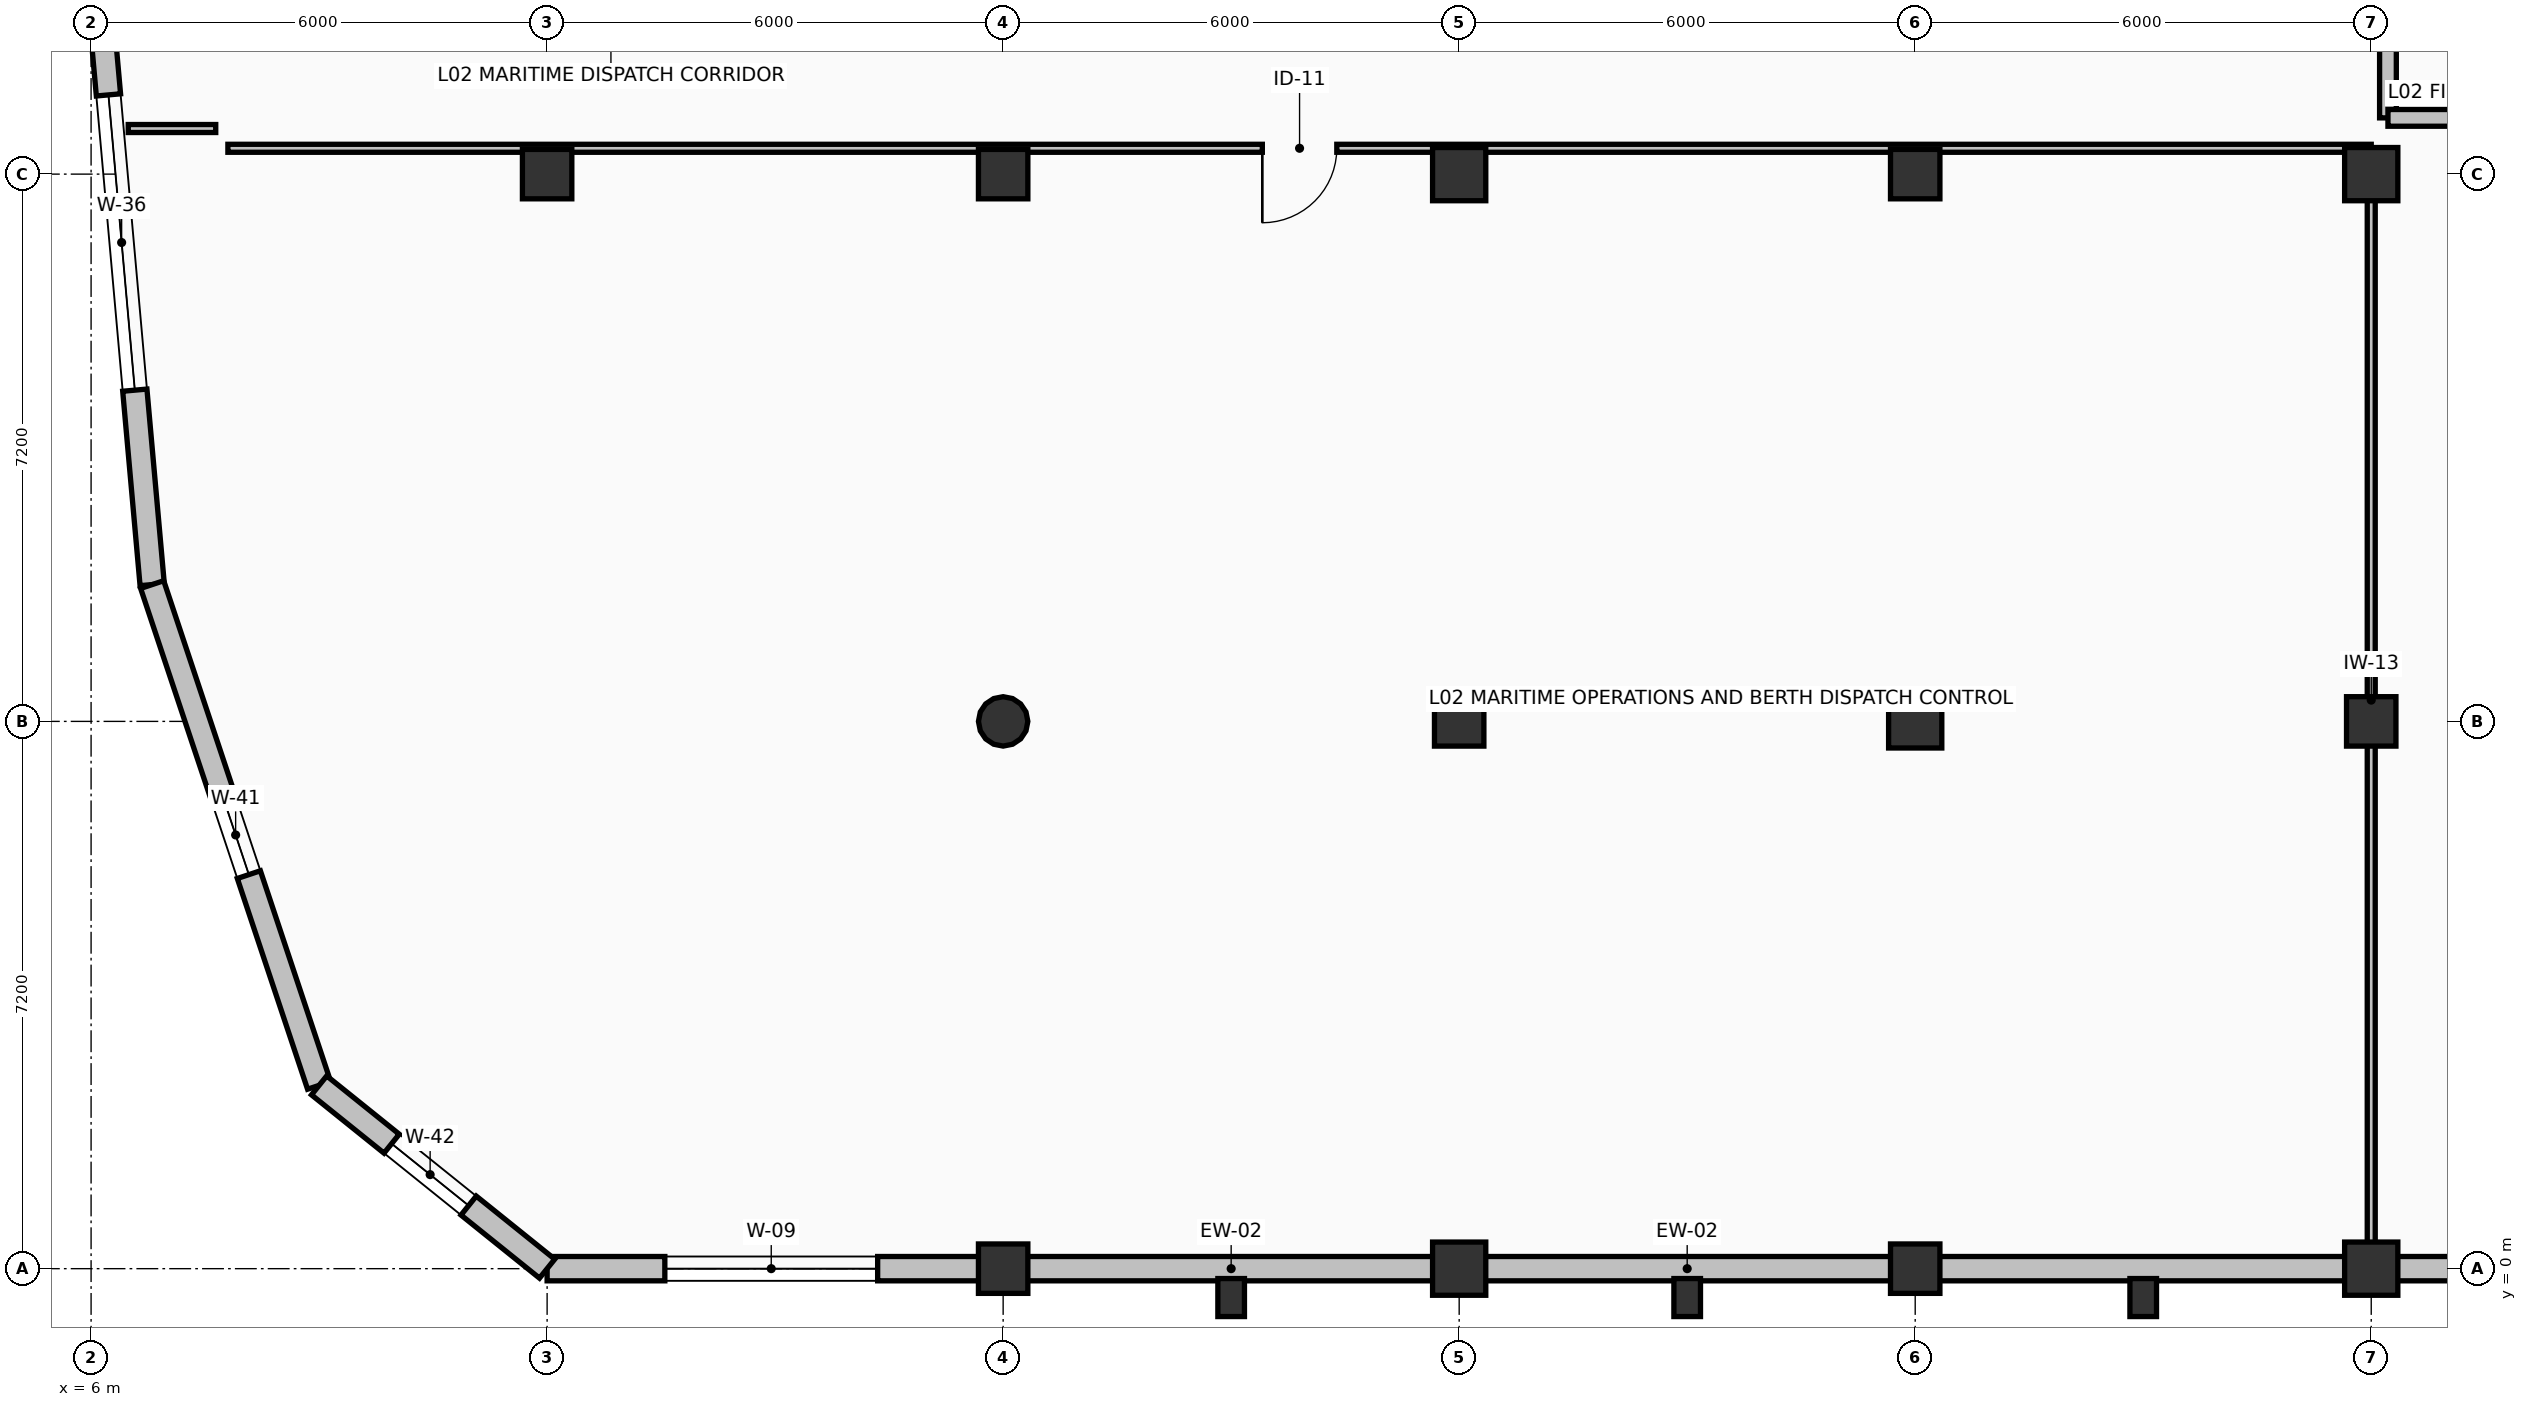
"""IFC4 building model, lengths in metres.
Left out: names, types, materials, properties, quantities, classifications, styles, units other than length and angle.
Written with IfcOpenShell. Run it as: python <this file> out.ifc"""

import sys

from ifc_helpers import new_model, si_unit, direction, frame, frame_2d, origin, origin_2d, place, context, subcontext, project, spatial, rectangle, circle, extrude, element, fill, save


model = new_model("IFC4")
c1 = context("Model", 3, precision=1e-05, world=origin(), true_north=direction((0.0, 1.0)))
c2 = subcontext(c1, "Body", "Model", "MODEL_VIEW")
j1 = project(units=[si_unit("LENGTHUNIT", "METRE"), si_unit("PLANEANGLEUNIT", "RADIAN")], contexts=[c1])
p1 = place(None, origin())
s1 = spatial("IfcSite", under=j1, at=p1, CompositionType="ELEMENT")
p2 = place(p1, origin())
s2 = spatial("IfcBuilding", under=s1, at=p2, CompositionType="ELEMENT")
p3 = place(p2, frame((0.0, 0.0, 9.84)))
s3 = spatial("IfcBuildingStorey", under=s2, at=p3, CompositionType="ELEMENT", Elevation=9.84)
for number, where, z_axis, x_axis in (
    (1, (12.0, 14.4, 0.0), (0.0, 0.0, 1.0), (1.0, 0.0, 0.0)),
    (2, (18.0, 0.0, 0.0), (0.0, 0.0, 1.0), (1.0, 0.0, 0.0)),
):
    element("IfcColumn", number, at=place(p3, frame(where, z_axis=z_axis, x_axis=x_axis)), inside=s3, PredefinedType="COLUMN", context=c2, shape_type="SweptSolid", body=[
        extrude(rectangle(XDim=0.65, YDim=0.65, at=origin_2d()), origin(), (0.0, 0.0, 1.0), 3.74),
    ])
p4 = place(p3, frame((18.0, 7.2, 0.0), z_axis=(0.0, 0.0, 1.0), x_axis=(1.0, 0.0, 0.0)))
e3 = element("IfcColumn", 3, at=p4, inside=s3, PredefinedType="COLUMN", context=c2, shape_type="SweptSolid", body=[
    extrude(circle(Radius=0.325, at=origin_2d()), origin(), (0.0, 0.0, 1.0), 3.74),
])
p5 = place(p3, frame((18.0, 14.4, 0.0), z_axis=(0.0, 0.0, 1.0), x_axis=(1.0, 0.0, 0.0)))
e4 = element("IfcColumn", 4, at=p5, inside=s3, PredefinedType="COLUMN", context=c2, shape_type="SweptSolid", body=[
    extrude(rectangle(XDim=0.65, YDim=0.65, at=origin_2d()), origin(), (0.0, 0.0, 1.0), 3.74),
])
p6 = place(p3, frame((24.0, 0.0, 0.0), z_axis=(0.0, 0.0, 1.0), x_axis=(1.0, 0.0, 0.0)))
e5 = element("IfcColumn", 5, at=p6, inside=s3, PredefinedType="COLUMN", context=c2, shape_type="SweptSolid", body=[
    extrude(rectangle(XDim=0.7, YDim=0.7, at=origin_2d()), origin(), (0.0, 0.0, 1.0), 3.74),
])
p7 = place(p3, frame((24.0, 7.2, 0.0), z_axis=(0.0, 0.0, 1.0), x_axis=(1.0, 0.0, 0.0)))
e6 = element("IfcColumn", 6, at=p7, inside=s3, PredefinedType="COLUMN", context=c2, shape_type="SweptSolid", body=[
    extrude(rectangle(XDim=0.65, YDim=0.65, at=origin_2d()), origin(), (0.0, 0.0, 1.0), 3.74),
])
p8 = place(p3, frame((24.0, 14.4, 0.0), z_axis=(0.0, 0.0, 1.0), x_axis=(1.0, 0.0, 0.0)))
e7 = element("IfcColumn", 7, at=p8, inside=s3, PredefinedType="COLUMN", context=c2, shape_type="SweptSolid", body=[
    extrude(rectangle(XDim=0.7, YDim=0.7, at=origin_2d()), origin(), (0.0, 0.0, 1.0), 3.74),
])
p9 = place(p3, frame((30.0, 0.0, 0.0), z_axis=(0.0, 0.0, 1.0), x_axis=(1.0, 0.0, 0.0)))
e8 = element("IfcColumn", 8, at=p9, inside=s3, PredefinedType="COLUMN", context=c2, shape_type="SweptSolid", body=[
    extrude(rectangle(XDim=0.65, YDim=0.65, at=origin_2d()), origin(), (0.0, 0.0, 1.0), 3.74),
])
p10 = place(p3, frame((30.0, 7.2, 0.0), z_axis=(0.0, 0.0, 1.0), x_axis=(1.0, 0.0, 0.0)))
e9 = element("IfcColumn", 9, at=p10, inside=s3, PredefinedType="COLUMN", context=c2, shape_type="SweptSolid", body=[
    extrude(rectangle(XDim=0.7, YDim=0.7, at=origin_2d()), origin(), (0.0, 0.0, 1.0), 3.74),
])
p11 = place(p3, frame((30.0, 14.4, 0.0), z_axis=(0.0, 0.0, 1.0), x_axis=(1.0, 0.0, 0.0)))
e10 = element("IfcColumn", 10, at=p11, inside=s3, PredefinedType="COLUMN", context=c2, shape_type="SweptSolid", body=[
    extrude(rectangle(XDim=0.65, YDim=0.65, at=origin_2d()), origin(), (0.0, 0.0, 1.0), 3.74),
])
p12 = place(p3, frame((36.0, 0.0, 0.0), z_axis=(0.0, 0.0, 1.0), x_axis=(1.0, 0.0, 0.0)))
e11 = element("IfcColumn", 11, at=p12, inside=s3, PredefinedType="COLUMN", context=c2, shape_type="SweptSolid", body=[
    extrude(rectangle(XDim=0.7, YDim=0.7, at=origin_2d()), origin(), (0.0, 0.0, 1.0), 3.74),
])
p13 = place(p3, frame((36.0, 7.2, 0.0), z_axis=(0.0, 0.0, 1.0), x_axis=(1.0, 0.0, 0.0)))
e12 = element("IfcColumn", 12, at=p13, inside=s3, PredefinedType="COLUMN", context=c2, shape_type="SweptSolid", body=[
    extrude(rectangle(XDim=0.65, YDim=0.65, at=origin_2d()), origin(), (0.0, 0.0, 1.0), 3.74),
])
p14 = place(p3, frame((36.0, 14.4, 0.0), z_axis=(0.0, 0.0, 1.0), x_axis=(1.0, 0.0, 0.0)))
e13 = element("IfcColumn", 13, at=p14, inside=s3, PredefinedType="COLUMN", context=c2, shape_type="SweptSolid", body=[
    extrude(rectangle(XDim=0.7, YDim=0.7, at=origin_2d()), origin(), (0.0, 0.0, 1.0), 3.74),
])
for number, where, z_axis, x_axis in (
    (14, (21.0, -0.38, 0.0), (0.0, 0.0, 1.0), (1.0, 0.0, 0.0)),
    (15, (27.0, -0.38, 0.0), (0.0, 0.0, 1.0), (1.0, 0.0, 0.0)),
    (16, (33.0, -0.38, 0.0), (0.0, 0.0, 1.0), (1.0, 0.0, 0.0)),
):
    element("IfcColumn", number, at=place(p3, frame(where, z_axis=z_axis, x_axis=x_axis)), inside=s3, PredefinedType="PILASTER", context=c2, shape_type="SweptSolid", body=[
        extrude(rectangle(XDim=0.35, YDim=0.5, at=origin_2d()), origin(), (0.0, 0.0, 1.0), 3.74),
    ])
p15 = place(p3, frame((12.0, 0.0, 0.0), z_axis=(0.0, 0.0, 1.0), x_axis=(1.0, 0.0, 0.0)))
e17 = element("IfcWall", 17, at=p15, inside=s3, PredefinedType="SOLIDWALL", context=c2, shape_type="SweptSolid", body=[
    extrude(rectangle(XDim=6.0, YDim=0.32, at=frame_2d((3.0, 0.0))), origin(), (0.0, 0.0, 1.0), 3.44),
])
p16 = place(p15, frame((1.549, 0.0, 0.95)))
e18 = element("IfcOpeningElement", 18, at=p16, cuts=e17, PredefinedType="OPENING", context=c2, shape_type="SweptSolid", body=[
    extrude(rectangle(XDim=2.8, YDim=1.35, at=frame_2d((1.4, 0.675))), frame((0.0, 0.17, 0.0), z_axis=(0.0, -1.0, 0.0), x_axis=(1.0, 0.0, 0.0)), (0.0, 0.0, 1.0), 0.34),
])
for number, where, z_axis, x_axis in (
    (19, (18.0, 0.0, 0.0), (0.0, 0.0, 1.0), (1.0, 0.0, 0.0)),
    (20, (24.0, 0.0, 0.0), (0.0, 0.0, 1.0), (1.0, 0.0, 0.0)),
    (21, (30.0, 0.0, 0.0), (0.0, 0.0, 1.0), (1.0, 0.0, 0.0)),
    (22, (36.0, 0.0, 0.0), (0.0, 0.0, 1.0), (1.0, 0.0, 0.0)),
):
    element("IfcWall", number, at=place(p3, frame(where, z_axis=z_axis, x_axis=x_axis)), inside=s3, PredefinedType="SOLIDWALL", context=c2, shape_type="SweptSolid", body=[
        extrude(rectangle(XDim=6.0, YDim=0.32, at=frame_2d((3.0, 0.0))), origin(), (0.0, 0.0, 1.0), 2.77),
    ])
p17 = place(p3, frame((6.0, 18.0, 0.0), z_axis=(0.0, 0.0, 1.0), x_axis=(0.088947255406, -0.996036337568, 0.0)))
e23 = element("IfcWall", 23, at=p17, inside=s3, PredefinedType="SOLIDWALL", context=c2, shape_type="SweptSolid", body=[
    extrude(rectangle(XDim=9.036, YDim=0.32, at=frame_2d((4.518, 0.0))), origin(), (0.0, 0.0, 1.0), 3.44),
])
p18 = place(p17, frame((2.568, 0.0, 0.95)))
e24 = element("IfcOpeningElement", 24, at=p18, cuts=e23, PredefinedType="OPENING", context=c2, shape_type="SweptSolid", body=[
    extrude(rectangle(XDim=3.9, YDim=1.55, at=frame_2d((1.95, 0.775))), frame((0.0, 0.17, 0.0), z_axis=(0.0, -1.0, 0.0), x_axis=(1.0, 0.0, 0.0)), (0.0, 0.0, 1.0), 0.34),
])
p19 = place(p3, frame((6.804, 9.0, 0.0), z_axis=(0.0, 0.0, 1.0), x_axis=(0.31624885857, -0.948676266939, 0.0)))
e25 = element("IfcWall", 25, at=p19, inside=s3, PredefinedType="SOLIDWALL", context=c2, shape_type="SweptSolid", body=[
    extrude(rectangle(XDim=6.945, YDim=0.32, at=frame_2d((3.472, 0.0))), origin(), (0.0, 0.0, 1.0), 3.44),
])
p20 = place(p19, frame((2.922, 0.0, 1.15)))
e26 = element("IfcOpeningElement", 26, at=p20, cuts=e25, PredefinedType="OPENING", context=c2, shape_type="SweptSolid", body=[
    extrude(rectangle(XDim=1.1, YDim=1.1, at=frame_2d((0.55, 0.55))), frame((0.0, 0.17, 0.0), z_axis=(0.0, -1.0, 0.0), x_axis=(1.0, 0.0, 0.0)), (0.0, 0.0, 1.0), 0.34),
])
p21 = place(p3, frame((9.0, 2.412, 0.0), z_axis=(0.0, 0.0, 1.0), x_axis=(0.779393889884, -0.626534248395, 0.0)))
e27 = element("IfcWall", 27, at=p21, inside=s3, PredefinedType="SOLIDWALL", context=c2, shape_type="SweptSolid", body=[
    extrude(rectangle(XDim=3.849, YDim=0.32, at=frame_2d((1.925, 0.0))), origin(), (0.0, 0.0, 1.0), 3.44),
])
p22 = place(p21, frame((1.224, 0.0, 1.15)))
e28 = element("IfcOpeningElement", 28, at=p22, cuts=e27, PredefinedType="OPENING", context=c2, shape_type="SweptSolid", body=[
    extrude(rectangle(XDim=1.3, YDim=1.3, at=frame_2d((0.65, 0.65))), frame((0.0, 0.17, 0.0), z_axis=(0.0, -1.0, 0.0), x_axis=(1.0, 0.0, 0.0)), (0.0, 0.0, 1.0), 0.34),
])
p23 = place(p3, frame((36.22, 18.25, 0.0), z_axis=(0.0, 0.0, 1.0), x_axis=(0.0, -1.0, 0.0)))
e29 = element("IfcWall", 29, at=p23, inside=s3, PredefinedType="SOLIDWALL", context=c2, shape_type="SweptSolid", body=[
    extrude(rectangle(XDim=3.11, YDim=0.22, at=frame_2d((1.555, 0.0))), origin(), (0.0, 0.0, 1.0), 2.72),
])
p24 = place(p23, frame((1.005, 0.0, 0.0)))
e30 = element("IfcOpeningElement", 30, at=p24, cuts=e29, PredefinedType="OPENING", context=c2, shape_type="SweptSolid", body=[
    extrude(rectangle(XDim=1.1, YDim=2.15, at=frame_2d((0.55, 1.075))), frame((0.0, 0.12, 0.0), z_axis=(0.0, -1.0, 0.0), x_axis=(1.0, 0.0, 0.0)), (0.0, 0.0, 1.0), 0.24),
])
p25 = place(p3, frame((36.22, 15.14, 0.0), z_axis=(0.0, 0.0, 1.0), x_axis=(1.0, 0.0, 0.0)))
e31 = element("IfcWall", 31, at=p25, inside=s3, PredefinedType="SOLIDWALL", context=c2, shape_type="SweptSolid", body=[
    extrude(rectangle(XDim=3.42, YDim=0.22, at=frame_2d((1.71, 0.0))), origin(), (0.0, 0.0, 1.0), 3.48),
])
p26 = place(p3, frame((36.0, 14.74, 0.0), z_axis=(0.0, 0.0, 1.0), x_axis=(-1.0, 0.0, 0.0)))
e32 = element("IfcWall", 32, at=p26, inside=s3, PredefinedType="PARTITIONING", context=c2, shape_type="SweptSolid", body=[
    extrude(rectangle(XDim=28.2, YDim=0.105, at=frame_2d((14.1, 0.0))), origin(), (0.0, 0.0, 1.0), 2.77),
])
p27 = place(p26, frame((13.61, 0.0, 0.0)))
e33 = element("IfcOpeningElement", 33, at=p27, cuts=e32, PredefinedType="OPENING", context=c2, shape_type="SweptSolid", body=[
    extrude(rectangle(XDim=0.98, YDim=2.12, at=frame_2d((0.49, 1.06))), frame((0.0, 0.062, 0.0), z_axis=(0.0, -1.0, 0.0), x_axis=(1.0, 0.0, 0.0)), (0.0, 0.0, 1.0), 0.125),
])
p28 = place(p3, frame((7.64, 15.0, 0.0), z_axis=(0.0, 0.0, 1.0), x_axis=(-1.0, 0.0, 0.0)))
e34 = element("IfcWall", 34, at=p28, inside=s3, PredefinedType="PARTITIONING", context=c2, shape_type="SweptSolid", body=[
    extrude(rectangle(XDim=1.151, YDim=0.105, at=frame_2d((0.576, 0.0))), origin(), (0.0, 0.0, 1.0), 3.16),
])
p29 = place(p3, frame((36.0, 0.22, 0.0), z_axis=(0.0, 0.0, 1.0), x_axis=(0.0, 1.0, 0.0)))
e35 = element("IfcWall", 35, at=p29, inside=s3, PredefinedType="PARTITIONING", context=c2, shape_type="SweptSolid", body=[
    extrude(rectangle(XDim=14.52, YDim=0.105, at=frame_2d((7.26, 0.0))), origin(), (0.0, 0.0, 1.0), 2.52),
])
p30 = place(p16, origin())
e36 = element("IfcWindow", 36, at=p30, inside=s3, PartitioningType="SINGLE_PANEL", PredefinedType="WINDOW", context=c2, shape_type="SweptSolid", body=[
    extrude(rectangle(XDim=2.8, YDim=1.35, at=frame_2d((1.4, 0.675))), frame((0.0, 0.03, 0.0), z_axis=(0.0, -1.0, 0.0), x_axis=(1.0, 0.0, 0.0)), (0.0, 0.0, 1.0), 0.06),
])
fill(e18, e36)
p31 = place(p18, origin())
e37 = element("IfcWindow", 37, at=p31, inside=s3, PartitioningType="SINGLE_PANEL", PredefinedType="WINDOW", context=c2, shape_type="SweptSolid", body=[
    extrude(rectangle(XDim=3.9, YDim=1.55, at=frame_2d((1.95, 0.775))), frame((0.0, 0.03, 0.0), z_axis=(0.0, -1.0, 0.0), x_axis=(1.0, 0.0, 0.0)), (0.0, 0.0, 1.0), 0.06),
])
fill(e24, e37)
p32 = place(p20, origin())
e38 = element("IfcWindow", 38, at=p32, inside=s3, PartitioningType="SINGLE_PANEL", PredefinedType="WINDOW", context=c2, shape_type="SweptSolid", body=[
    extrude(rectangle(XDim=1.1, YDim=1.1, at=frame_2d((0.55, 0.55))), frame((0.0, 0.03, 0.0), z_axis=(0.0, -1.0, 0.0), x_axis=(1.0, 0.0, 0.0)), (0.0, 0.0, 1.0), 0.06),
])
fill(e26, e38)
p33 = place(p22, origin())
e39 = element("IfcWindow", 39, at=p33, inside=s3, PartitioningType="SINGLE_PANEL", PredefinedType="WINDOW", context=c2, shape_type="SweptSolid", body=[
    extrude(rectangle(XDim=1.3, YDim=1.3, at=frame_2d((0.65, 0.65))), frame((0.0, 0.03, 0.0), z_axis=(0.0, -1.0, 0.0), x_axis=(1.0, 0.0, 0.0)), (0.0, 0.0, 1.0), 0.06),
])
fill(e28, e39)
p34 = place(p27, origin())
e40 = element("IfcDoor", 40, at=p34, inside=s3, OperationType="SINGLE_SWING_RIGHT", PredefinedType="DOOR", context=c2, shape_type="SweptSolid", body=[
    extrude(rectangle(XDim=0.98, YDim=2.12, at=frame_2d((0.49, 1.06))), frame((0.0, 0.025, 0.0), z_axis=(0.0, -1.0, 0.0), x_axis=(1.0, 0.0, 0.0)), (0.0, 0.0, 1.0), 0.05),
])
fill(e33, e40)
save(model, sys.argv[1])
